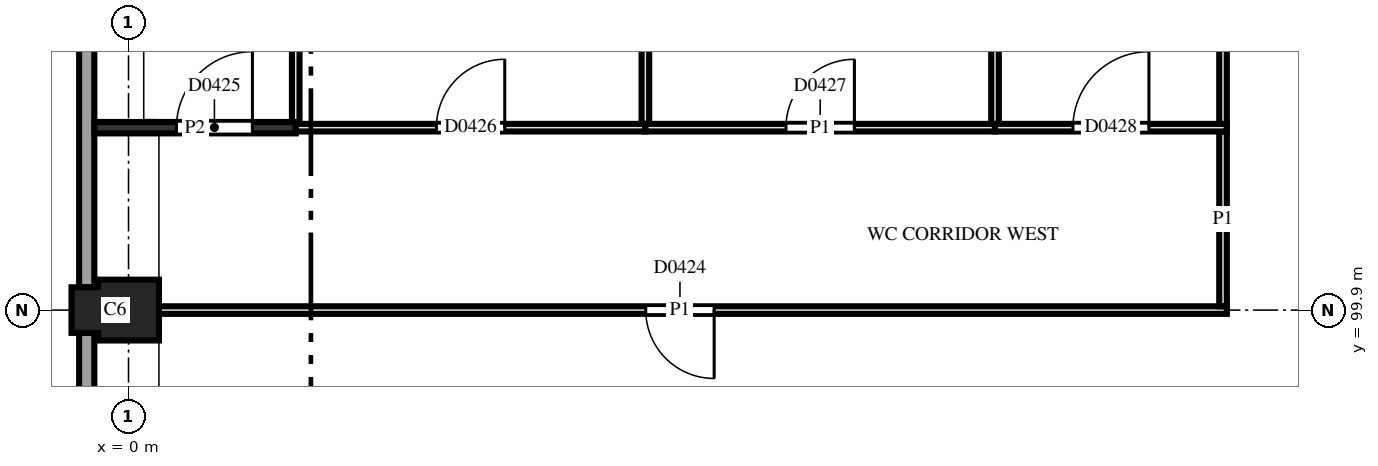
"""IFC4 building model, lengths in metres.
Left out: names, types, materials, properties, quantities, classifications, styles, units other than length and angle.
Written with IfcOpenShell. Run it as: python <this file> out.ifc"""

import sys

from ifc_helpers import new_model, si_unit, direction, frame, frame_2d, origin, place, context, subcontext, project, spatial, polyline, rectangle, outline, extrude, element, fill, save


model = new_model("IFC4")
c1 = context("Model", 3, precision=1e-05, world=origin(), true_north=direction((0.0, 1.0)))
c2 = subcontext(c1, "Body", "Model", "MODEL_VIEW")
j1 = project(units=[si_unit("LENGTHUNIT", "METRE"), si_unit("PLANEANGLEUNIT", "RADIAN")], contexts=[c1])
p1 = place(None, origin())
s1 = spatial("IfcSite", under=j1, at=p1, CompositionType="ELEMENT")
p2 = place(p1, origin())
s2 = spatial("IfcBuilding", under=s1, at=p2, CompositionType="ELEMENT")
p3 = place(p2, frame((0.0, 0.0, 15.6)))
s3 = spatial("IfcBuildingStorey", under=s2, at=p3, CompositionType="ELEMENT", Elevation=15.6)
p4 = place(p3, frame((0.0, 99.9, 0.0), z_axis=(0.0, 0.0, 1.0), x_axis=(-1.0, 0.0, 0.0)))
e1 = element("IfcColumn", 1, at=p4, inside=s3, PredefinedType="COLUMN", context=c2, shape_type="SweptSolid", body=[
    extrude(outline(polyline([(-0.4, -0.4), (0.4, -0.4), (0.4, -0.3), (0.75, -0.3), (0.75, 0.3), (0.4, 0.3), (0.4, 0.4), (-0.4, 0.4), (-0.4, -0.4)])), origin(), (0.0, 0.0, 1.0), 3.7),
])
p5 = place(p3, frame((-0.55, 107.1, 0.0), z_axis=(0.0, 0.0, 1.0), x_axis=(0.0, -1.0, 0.0)))
e2 = element("IfcWall", 2, at=p5, inside=s3, PredefinedType="SOLIDWALL", context=c2, shape_type="SweptSolid", body=[
    extrude(rectangle(XDim=6.9, YDim=0.2, at=frame_2d((3.45, 0.0))), origin(), (0.0, 0.0, 1.0), 2.3),
])
p6 = place(p5, frame((1.1, 0.0, 0.55)))
e3 = element("IfcOpeningElement", 3, at=p6, cuts=e2, PredefinedType="OPENING", context=c2, shape_type="SweptSolid", body=[
    extrude(rectangle(XDim=2.4, YDim=1.0, at=frame_2d((1.2, 0.5))), frame((0.0, 0.11, 0.0), z_axis=(0.0, -1.0, 0.0), x_axis=(1.0, 0.0, 0.0)), (0.0, 0.0, 1.0), 0.22),
])
p7 = place(p3, frame((-0.55, 99.6, 0.0), z_axis=(0.0, 0.0, 1.0), x_axis=(0.0, -1.0, 0.0)))
e4 = element("IfcWall", 4, at=p7, inside=s3, PredefinedType="SOLIDWALL", context=c2, shape_type="SweptSolid", body=[
    extrude(rectangle(XDim=6.9, YDim=0.2, at=frame_2d((3.45, 0.0))), origin(), (0.0, 0.0, 1.0), 2.3),
])
p8 = place(p7, frame((2.25, 0.0, 0.55)))
e5 = element("IfcOpeningElement", 5, at=p8, cuts=e4, PredefinedType="OPENING", context=c2, shape_type="SweptSolid", body=[
    extrude(rectangle(XDim=2.4, YDim=1.0, at=frame_2d((1.2, 0.5))), frame((0.0, 0.11, 0.0), z_axis=(0.0, -1.0, 0.0), x_axis=(1.0, 0.0, 0.0)), (0.0, 0.0, 1.0), 0.22),
])
p9 = place(p3, frame((0.06, 99.9, 0.0), z_axis=(0.0, 0.0, 1.0), x_axis=(1.0, 0.0, 0.0)))
e6 = element("IfcWall", 6, at=p9, inside=s3, PredefinedType="PARTITIONING", context=c2, shape_type="SweptSolid", body=[
    extrude(rectangle(XDim=14.39, YDim=0.1, at=frame_2d((7.195, 0.0))), origin(), (0.0, 0.0, 1.0), 2.88),
])
p10 = place(p9, frame((6.745, 0.0, 0.0)))
e7 = element("IfcOpeningElement", 7, at=p10, cuts=e6, PredefinedType="OPENING", context=c2, shape_type="SweptSolid", body=[
    extrude(rectangle(XDim=0.9, YDim=2.1, at=frame_2d((0.45, 1.05))), frame((0.0, 0.06, 0.0), z_axis=(0.0, -1.0, 0.0), x_axis=(1.0, 0.0, 0.0)), (0.0, 0.0, 1.0), 0.12),
])
p11 = place(p3, frame((14.4, 99.95, 0.0), z_axis=(0.0, 0.0, 1.0), x_axis=(0.0, 1.0, 0.0)))
e8 = element("IfcWall", 8, at=p11, inside=s3, PredefinedType="PARTITIONING", context=c2, shape_type="SweptSolid", body=[
    extrude(rectangle(XDim=2.3, YDim=0.1, at=frame_2d((1.15, 0.0))), origin(), (0.0, 0.0, 1.0), 2.88),
])
p12 = place(p3, frame((2.2, 102.3, 0.0), z_axis=(0.0, 0.0, 1.0), x_axis=(-1.0, 0.0, 0.0)))
e9 = element("IfcWall", 9, at=p12, inside=s3, PredefinedType="PARTITIONING", context=c2, shape_type="SweptSolid", body=[
    extrude(rectangle(XDim=2.65, YDim=0.15, at=frame_2d((1.325, 0.0))), origin(), (0.0, 0.0, 1.0), 2.88),
])
p13 = place(p12, frame((0.57, 0.0, 0.0)))
e10 = element("IfcOpeningElement", 10, at=p13, cuts=e9, PredefinedType="OPENING", context=c2, shape_type="SweptSolid", body=[
    extrude(rectangle(XDim=1.0, YDim=2.1, at=frame_2d((0.5, 1.05))), frame((0.0, 0.085, 0.0), z_axis=(0.0, -1.0, 0.0), x_axis=(1.0, 0.0, 0.0)), (0.0, 0.0, 1.0), 0.17),
])
p14 = place(p3, frame((2.2, 102.375, 0.0), z_axis=(0.0, 0.0, 1.0), x_axis=(0.0, 1.0, 0.0)))
e11 = element("IfcWall", 11, at=p14, inside=s3, PredefinedType="PARTITIONING", context=c2, shape_type="SweptSolid", body=[
    extrude(rectangle(XDim=4.975, YDim=0.1, at=frame_2d((2.488, 0.0))), origin(), (0.0, 0.0, 1.0), 2.88),
])
p15 = place(p3, frame((6.8, 102.3, 0.0), z_axis=(0.0, 0.0, 1.0), x_axis=(-1.0, 0.0, 0.0)))
e12 = element("IfcWall", 12, at=p15, inside=s3, PredefinedType="PARTITIONING", context=c2, shape_type="SweptSolid", body=[
    extrude(rectangle(XDim=4.6, YDim=0.1, at=frame_2d((2.3, 0.0))), origin(), (0.0, 0.0, 1.0), 2.88),
])
p16 = place(p15, frame((1.85, 0.0, 0.0)))
e13 = element("IfcOpeningElement", 13, at=p16, cuts=e12, PredefinedType="OPENING", context=c2, shape_type="SweptSolid", body=[
    extrude(rectangle(XDim=0.9, YDim=2.1, at=frame_2d((0.45, 1.05))), frame((0.0, 0.06, 0.0), z_axis=(0.0, -1.0, 0.0), x_axis=(1.0, 0.0, 0.0)), (0.0, 0.0, 1.0), 0.12),
])
p17 = place(p3, frame((6.8, 102.35, 0.0), z_axis=(0.0, 0.0, 1.0), x_axis=(0.0, 1.0, 0.0)))
e14 = element("IfcWall", 14, at=p17, inside=s3, PredefinedType="PARTITIONING", context=c2, shape_type="SweptSolid", body=[
    extrude(rectangle(XDim=4.95, YDim=0.1, at=frame_2d((2.475, 0.0))), origin(), (0.0, 0.0, 1.0), 2.88),
])
p18 = place(p3, frame((11.4, 102.3, 0.0), z_axis=(0.0, 0.0, 1.0), x_axis=(-1.0, 0.0, 0.0)))
e15 = element("IfcWall", 15, at=p18, inside=s3, PredefinedType="PARTITIONING", context=c2, shape_type="SweptSolid", body=[
    extrude(rectangle(XDim=4.6, YDim=0.1, at=frame_2d((2.3, 0.0))), origin(), (0.0, 0.0, 1.0), 2.88),
])
p19 = place(p18, frame((1.85, 0.0, 0.0)))
e16 = element("IfcOpeningElement", 16, at=p19, cuts=e15, PredefinedType="OPENING", context=c2, shape_type="SweptSolid", body=[
    extrude(rectangle(XDim=0.9, YDim=2.1, at=frame_2d((0.45, 1.05))), frame((0.0, 0.06, 0.0), z_axis=(0.0, -1.0, 0.0), x_axis=(1.0, 0.0, 0.0)), (0.0, 0.0, 1.0), 0.12),
])
p20 = place(p3, frame((11.4, 102.35, 0.0), z_axis=(0.0, 0.0, 1.0), x_axis=(0.0, 1.0, 0.0)))
e17 = element("IfcWall", 17, at=p20, inside=s3, PredefinedType="PARTITIONING", context=c2, shape_type="SweptSolid", body=[
    extrude(rectangle(XDim=5.0, YDim=0.1, at=frame_2d((2.5, 0.0))), origin(), (0.0, 0.0, 1.0), 2.88),
])
p21 = place(p3, frame((14.45, 102.3, 0.0), z_axis=(0.0, 0.0, 1.0), x_axis=(-1.0, 0.0, 0.0)))
e18 = element("IfcWall", 18, at=p21, inside=s3, PredefinedType="PARTITIONING", context=c2, shape_type="SweptSolid", body=[
    extrude(rectangle(XDim=3.05, YDim=0.1, at=frame_2d((1.525, 0.0))), origin(), (0.0, 0.0, 1.0), 2.88),
])
p22 = place(p21, frame((1.025, 0.0, 0.0)))
e19 = element("IfcOpeningElement", 19, at=p22, cuts=e18, PredefinedType="OPENING", context=c2, shape_type="SweptSolid", body=[
    extrude(rectangle(XDim=1.0, YDim=2.1, at=frame_2d((0.5, 1.05))), frame((0.0, 0.06, 0.0), z_axis=(0.0, -1.0, 0.0), x_axis=(1.0, 0.0, 0.0)), (0.0, 0.0, 1.0), 0.12),
])
p23 = place(p3, frame((14.4, 102.35, 0.0), z_axis=(0.0, 0.0, 1.0), x_axis=(0.0, 1.0, 0.0)))
e20 = element("IfcWall", 20, at=p23, inside=s3, PredefinedType="PARTITIONING", context=c2, shape_type="SweptSolid", body=[
    extrude(rectangle(XDim=5.0, YDim=0.1, at=frame_2d((2.5, 0.0))), origin(), (0.0, 0.0, 1.0), 2.88),
])
p24 = place(p10, origin())
e21 = element("IfcDoor", 21, at=p24, inside=s3, OperationType="SINGLE_SWING_RIGHT", PredefinedType="DOOR", context=c2, shape_type="SweptSolid", body=[
    extrude(rectangle(XDim=0.9, YDim=2.1, at=frame_2d((0.45, 1.05))), frame((0.0, 0.025, 0.0), z_axis=(0.0, -1.0, 0.0), x_axis=(1.0, 0.0, 0.0)), (0.0, 0.0, 1.0), 0.05),
])
fill(e7, e21)
p25 = place(p13, origin())
e22 = element("IfcDoor", 22, at=p25, inside=s3, OperationType="SINGLE_SWING_LEFT", PredefinedType="DOOR", context=c2, shape_type="SweptSolid", body=[
    extrude(rectangle(XDim=1.0, YDim=2.1, at=frame_2d((0.5, 1.05))), frame((0.0, 0.025, 0.0), z_axis=(0.0, -1.0, 0.0), x_axis=(1.0, 0.0, 0.0)), (0.0, 0.0, 1.0), 0.05),
])
fill(e10, e22)
p26 = place(p16, origin())
e23 = element("IfcDoor", 23, at=p26, inside=s3, OperationType="SINGLE_SWING_LEFT", PredefinedType="DOOR", context=c2, shape_type="SweptSolid", body=[
    extrude(rectangle(XDim=0.9, YDim=2.1, at=frame_2d((0.45, 1.05))), frame((0.0, 0.025, 0.0), z_axis=(0.0, -1.0, 0.0), x_axis=(1.0, 0.0, 0.0)), (0.0, 0.0, 1.0), 0.05),
])
fill(e13, e23)
p27 = place(p19, origin())
e24 = element("IfcDoor", 24, at=p27, inside=s3, OperationType="SINGLE_SWING_LEFT", PredefinedType="DOOR", context=c2, shape_type="SweptSolid", body=[
    extrude(rectangle(XDim=0.9, YDim=2.1, at=frame_2d((0.45, 1.05))), frame((0.0, 0.025, 0.0), z_axis=(0.0, -1.0, 0.0), x_axis=(1.0, 0.0, 0.0)), (0.0, 0.0, 1.0), 0.05),
])
fill(e16, e24)
p28 = place(p22, origin())
e25 = element("IfcDoor", 25, at=p28, inside=s3, OperationType="SINGLE_SWING_LEFT", PredefinedType="DOOR", context=c2, shape_type="SweptSolid", body=[
    extrude(rectangle(XDim=1.0, YDim=2.1, at=frame_2d((0.5, 1.05))), frame((0.0, 0.025, 0.0), z_axis=(0.0, -1.0, 0.0), x_axis=(1.0, 0.0, 0.0)), (0.0, 0.0, 1.0), 0.05),
])
fill(e19, e25)
save(model, sys.argv[1])
